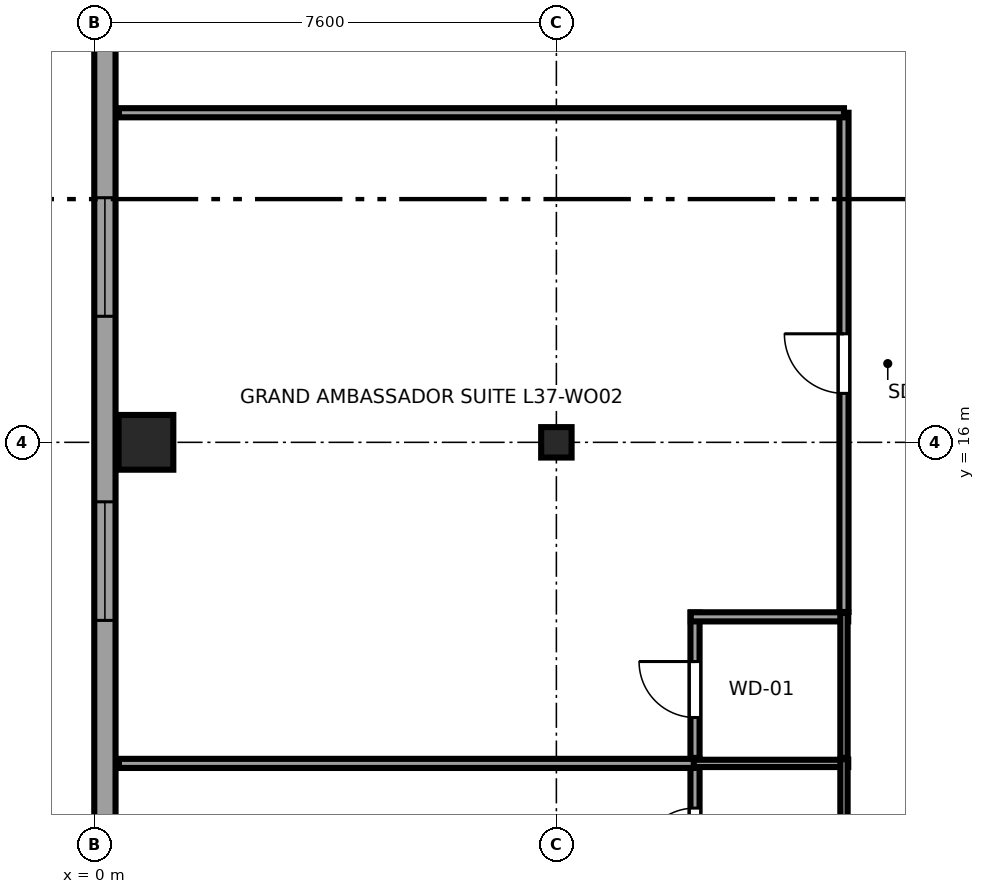
"""IFC4 building model, lengths in metres.
Left out: names, types, materials, properties, quantities, classifications, styles, units other than length and angle.
Written with IfcOpenShell. Run it as: python <this file> out.ifc"""

import sys

from ifc_helpers import new_model, si_unit, direction, frame, frame_2d, origin, origin_2d, place, context, subcontext, project, spatial, rectangle, i_section, extrude, source, transform, mapped, element, fill, save


model = new_model("IFC4")
c1 = context("Model", 3, precision=1e-05, world=origin(), true_north=direction((0.0, 1.0)))
c2 = subcontext(c1, "Body", "Model", "MODEL_VIEW")
j1 = project(units=[si_unit("LENGTHUNIT", "METRE"), si_unit("PLANEANGLEUNIT", "RADIAN")], contexts=[c1])
p1 = place(None, origin())
s1 = spatial("IfcSite", under=j1, at=p1, CompositionType="ELEMENT")
p2 = place(p1, origin())
s2 = spatial("IfcBuilding", under=s1, at=p2, CompositionType="ELEMENT")
p3 = place(p2, frame((0.0, 0.0, 143.5)))
s3 = spatial("IfcBuildingStorey", under=s2, at=p3, CompositionType="ELEMENT", Elevation=143.5)
m1 = source(origin(), c2, "Body", "SweptSolid", [
    extrude(rectangle(XDim=0.9, YDim=0.9, at=origin_2d()), origin(), (0.0, 0.0, 1.0), 3.55),
])
p4 = place(p3, frame((0.85, 16.0, 0.0), z_axis=(0.0, 0.0, 1.0), x_axis=(1.0, 0.0, 0.0)))
e1 = element("IfcColumn", 1, at=p4, inside=s3, PredefinedType="COLUMN", context=c2, shape_type="MappedRepresentation", body=[
    mapped(m1, transform((0.0, 0.0, 0.0), x_axis=(1.0, 0.0, 0.0), y_axis=(0.0, 1.0, 0.0), z_axis=(0.0, 0.0, 1.0), scale=1.0)),
])
m2 = source(origin(), c2, "Body", "SweptSolid", [
    extrude(i_section(OverallWidth=0.5, OverallDepth=0.5, WebThickness=0.022, FlangeThickness=0.034, at=origin_2d()), origin(), (0.0, 0.0, 1.0), 3.55),
])
p5 = place(p3, frame((7.6, 16.0, 0.0), z_axis=(0.0, 0.0, 1.0), x_axis=(1.0, 0.0, 0.0)))
e2 = element("IfcColumn", 2, at=p5, inside=s3, PredefinedType="COLUMN", context=c2, shape_type="MappedRepresentation", body=[
    mapped(m2, transform((0.0, 0.0, 0.0), x_axis=(1.0, 0.0, 0.0), y_axis=(0.0, 1.0, 0.0), z_axis=(0.0, 0.0, 1.0), scale=1.0)),
])
p6 = place(p3, frame((0.175, 41.383, 0.0), z_axis=(0.0, 0.0, 1.0), x_axis=(0.0, -1.0, 0.0)))
e3 = element("IfcWall", 3, at=p6, inside=s3, PredefinedType="SOLIDWALL", context=c2, shape_type="SweptSolid", body=[
    extrude(rectangle(XDim=36.766, YDim=0.35, at=frame_2d((18.383, 0.0))), origin(), (0.0, 0.0, 1.0), 3.29),
])
p7 = place(p6, frame((0.551, 0.0, 0.68)))
e4 = element("IfcOpeningElement", 4, at=p7, cuts=e3, PredefinedType="OPENING", context=c2, shape_type="SweptSolid", body=[
    extrude(rectangle(XDim=1.95, YDim=1.82, at=frame_2d((0.975, 0.91))), frame((0.0, 0.185, 0.0), z_axis=(0.0, -1.0, 0.0), x_axis=(1.0, 0.0, 0.0)), (0.0, 0.0, 1.0), 0.37),
])
p8 = place(p6, frame((4.503, 0.0, 0.68)))
e5 = element("IfcOpeningElement", 5, at=p8, cuts=e3, PredefinedType="OPENING", context=c2, shape_type="SweptSolid", body=[
    extrude(rectangle(XDim=1.95, YDim=1.82, at=frame_2d((0.975, 0.91))), frame((0.0, 0.185, 0.0), z_axis=(0.0, -1.0, 0.0), x_axis=(1.0, 0.0, 0.0)), (0.0, 0.0, 1.0), 0.37),
])
p9 = place(p6, frame((10.554, 0.0, 0.68)))
e6 = element("IfcOpeningElement", 6, at=p9, cuts=e3, PredefinedType="OPENING", context=c2, shape_type="SweptSolid", body=[
    extrude(rectangle(XDim=1.95, YDim=1.82, at=frame_2d((0.975, 0.91))), frame((0.0, 0.185, 0.0), z_axis=(0.0, -1.0, 0.0), x_axis=(1.0, 0.0, 0.0)), (0.0, 0.0, 1.0), 0.37),
])
p10 = place(p6, frame((13.456, 0.0, 0.68)))
e7 = element("IfcOpeningElement", 7, at=p10, cuts=e3, PredefinedType="OPENING", context=c2, shape_type="SweptSolid", body=[
    extrude(rectangle(XDim=1.95, YDim=1.82, at=frame_2d((0.975, 0.91))), frame((0.0, 0.185, 0.0), z_axis=(0.0, -1.0, 0.0), x_axis=(1.0, 0.0, 0.0)), (0.0, 0.0, 1.0), 0.37),
])
p11 = place(p6, frame((21.36, 0.0, 0.68)))
e8 = element("IfcOpeningElement", 8, at=p11, cuts=e3, PredefinedType="OPENING", context=c2, shape_type="SweptSolid", body=[
    extrude(rectangle(XDim=1.95, YDim=1.82, at=frame_2d((0.975, 0.91))), frame((0.0, 0.185, 0.0), z_axis=(0.0, -1.0, 0.0), x_axis=(1.0, 0.0, 0.0)), (0.0, 0.0, 1.0), 0.37),
])
p12 = place(p6, frame((26.361, 0.0, 0.68)))
e9 = element("IfcOpeningElement", 9, at=p12, cuts=e3, PredefinedType="OPENING", context=c2, shape_type="SweptSolid", body=[
    extrude(rectangle(XDim=1.95, YDim=1.82, at=frame_2d((0.975, 0.91))), frame((0.0, 0.185, 0.0), z_axis=(0.0, -1.0, 0.0), x_axis=(1.0, 0.0, 0.0)), (0.0, 0.0, 1.0), 0.37),
])
p13 = place(p6, frame((34.265, 0.0, 0.68)))
e10 = element("IfcOpeningElement", 10, at=p13, cuts=e3, PredefinedType="OPENING", context=c2, shape_type="SweptSolid", body=[
    extrude(rectangle(XDim=1.95, YDim=1.82, at=frame_2d((0.975, 0.91))), frame((0.0, 0.185, 0.0), z_axis=(0.0, -1.0, 0.0), x_axis=(1.0, 0.0, 0.0)), (0.0, 0.0, 1.0), 0.37),
])
p14 = place(p3, frame((9.88, 8.4, 0.0), z_axis=(0.0, 0.0, 1.0), x_axis=(0.0, 1.0, 0.0)))
e11 = element("IfcWall", 11, at=p14, inside=s3, PredefinedType="PARTITIONING", context=c2, shape_type="SweptSolid", body=[
    extrude(rectangle(XDim=2.39, YDim=0.15, at=frame_2d((1.195, 0.0))), origin(), (0.0, 0.0, 1.0), 3.29),
])
p15 = place(p14, frame((0.665, 0.0, 0.0)))
e12 = element("IfcOpeningElement", 12, at=p15, cuts=e11, PredefinedType="OPENING", context=c2, shape_type="SweptSolid", body=[
    extrude(rectangle(XDim=0.92, YDim=2.01, at=frame_2d((0.46, 1.005))), frame((0.0, 0.085, 0.0), z_axis=(0.0, -1.0, 0.0), x_axis=(1.0, 0.0, 0.0)), (0.0, 0.0, 1.0), 0.17),
])
p16 = place(p3, frame((9.81, 10.72, 0.0), z_axis=(0.0, 0.0, 1.0), x_axis=(1.0, 0.0, 0.0)))
e13 = element("IfcWall", 13, at=p16, inside=s3, PredefinedType="PLUMBINGWALL", context=c2, shape_type="SweptSolid", body=[
    extrude(rectangle(XDim=2.59, YDim=0.12, at=frame_2d((1.295, 0.0))), origin(), (0.0, 0.0, 1.0), 3.29),
])
p17 = place(p3, frame((12.33, 8.4, 0.0), z_axis=(0.0, 0.0, 1.0), x_axis=(0.0, 1.0, 0.0)))
e14 = element("IfcWall", 14, at=p17, inside=s3, PredefinedType="PLUMBINGWALL", context=c2, shape_type="SweptSolid", body=[
    extrude(rectangle(XDim=2.39, YDim=0.12, at=frame_2d((1.195, 0.0))), origin(), (0.0, 0.0, 1.0), 3.29),
])
p18 = place(p3, frame((9.88, 10.81, 0.0), z_axis=(0.0, 0.0, 1.0), x_axis=(0.0, 1.0, 0.0)))
e15 = element("IfcWall", 15, at=p18, inside=s3, PredefinedType="PARTITIONING", context=c2, shape_type="SweptSolid", body=[
    extrude(rectangle(XDim=2.39, YDim=0.15, at=frame_2d((1.195, 0.0))), origin(), (0.0, 0.0, 1.0), 3.29),
])
p19 = place(p18, frame((0.665, 0.0, 0.0)))
e16 = element("IfcOpeningElement", 16, at=p19, cuts=e15, PredefinedType="OPENING", context=c2, shape_type="SweptSolid", body=[
    extrude(rectangle(XDim=0.92, YDim=2.01, at=frame_2d((0.46, 1.005))), frame((0.0, 0.085, 0.0), z_axis=(0.0, -1.0, 0.0), x_axis=(1.0, 0.0, 0.0)), (0.0, 0.0, 1.0), 0.17),
])
p20 = place(p3, frame((9.81, 13.13, 0.0), z_axis=(0.0, 0.0, 1.0), x_axis=(1.0, 0.0, 0.0)))
e17 = element("IfcWall", 17, at=p20, inside=s3, PredefinedType="PARTITIONING", context=c2, shape_type="SweptSolid", body=[
    extrude(rectangle(XDim=2.59, YDim=0.15, at=frame_2d((1.295, 0.0))), origin(), (0.0, 0.0, 1.0), 3.29),
])
p21 = place(p3, frame((12.33, 10.81, 0.0), z_axis=(0.0, 0.0, 1.0), x_axis=(0.0, 1.0, 0.0)))
e18 = element("IfcWall", 18, at=p21, inside=s3, PredefinedType="PLUMBINGWALL", context=c2, shape_type="SweptSolid", body=[
    extrude(rectangle(XDim=2.39, YDim=0.12, at=frame_2d((1.195, 0.0))), origin(), (0.0, 0.0, 1.0), 3.29),
])
p22 = place(p3, frame((0.405, 10.72, 0.0), z_axis=(0.0, 0.0, 1.0), x_axis=(1.0, 0.0, 0.0)))
e19 = element("IfcWall", 19, at=p22, inside=s3, PredefinedType="PARTITIONING", context=c2, shape_type="SweptSolid", body=[
    extrude(rectangle(XDim=9.455, YDim=0.15, at=frame_2d((4.728, 0.0))), origin(), (0.0, 0.0, 1.0), 3.29),
])
p23 = place(p3, frame((12.33, 13.21, 0.0), z_axis=(0.0, 0.0, 1.0), x_axis=(0.0, 1.0, 0.0)))
e20 = element("IfcWall", 20, at=p23, inside=s3, PredefinedType="PARTITIONING", context=c2, shape_type="SweptSolid", body=[
    extrude(rectangle(XDim=8.21, YDim=0.15, at=frame_2d((4.105, 0.0))), origin(), (0.0, 0.0, 1.0), 3.29),
])
p24 = place(p23, frame((3.595, 0.0, 0.0)))
e21 = element("IfcOpeningElement", 21, at=p24, cuts=e20, PredefinedType="OPENING", context=c2, shape_type="SweptSolid", body=[
    extrude(rectangle(XDim=0.98, YDim=2.12, at=frame_2d((0.49, 1.06))), frame((0.0, 0.085, 0.0), z_axis=(0.0, -1.0, 0.0), x_axis=(1.0, 0.0, 0.0)), (0.0, 0.0, 1.0), 0.17),
])
p25 = place(p3, frame((0.405, 21.42, 0.0), z_axis=(0.0, 0.0, 1.0), x_axis=(1.0, 0.0, 0.0)))
e22 = element("IfcWall", 22, at=p25, inside=s3, PredefinedType="PARTITIONING", context=c2, shape_type="SweptSolid", body=[
    extrude(rectangle(XDim=11.925, YDim=0.15, at=frame_2d((5.962, 0.0))), origin(), (0.0, 0.0, 1.0), 3.29),
])
m3 = source(origin(), c2, "Body", "SweptSolid", [
    extrude(rectangle(XDim=1.95, YDim=1.82, at=frame_2d((0.975, 0.91))), frame((0.0, 0.09, 0.0), z_axis=(0.0, -1.0, 0.0), x_axis=(1.0, 0.0, 0.0)), (0.0, 0.0, 1.0), 0.06),
])
p26 = place(p11, origin())
e23 = element("IfcWindow", 23, at=p26, inside=s3, PartitioningType="DOUBLE_PANEL_VERTICAL", PredefinedType="WINDOW", context=c2, shape_type="MappedRepresentation", body=[
    mapped(m3, transform((0.0, 0.0, 0.0), x_axis=(1.0, 0.0, 0.0), y_axis=(0.0, 1.0, 0.0), z_axis=(0.0, 0.0, 1.0), scale=1.0)),
])
fill(e8, e23)
p27 = place(p12, origin())
e24 = element("IfcWindow", 24, at=p27, inside=s3, PartitioningType="DOUBLE_PANEL_VERTICAL", PredefinedType="WINDOW", context=c2, shape_type="MappedRepresentation", body=[
    mapped(m3, transform((0.0, 0.0, 0.0), x_axis=(1.0, 0.0, 0.0), y_axis=(0.0, 1.0, 0.0), z_axis=(0.0, 0.0, 1.0), scale=1.0)),
])
fill(e9, e24)
m4 = source(origin(), c2, "Body", "SweptSolid", [
    extrude(rectangle(XDim=0.92, YDim=2.01, at=frame_2d((0.46, 1.005))), frame((0.0, 0.025, 0.0), z_axis=(0.0, -1.0, 0.0), x_axis=(1.0, 0.0, 0.0)), (0.0, 0.0, 1.0), 0.05),
])
p28 = place(p15, origin())
e25 = element("IfcDoor", 25, at=p28, inside=s3, OperationType="SINGLE_SWING_LEFT", PredefinedType="DOOR", context=c2, shape_type="MappedRepresentation", body=[
    mapped(m4, transform((0.0, 0.0, 0.0), x_axis=(1.0, 0.0, 0.0), y_axis=(0.0, 1.0, 0.0), z_axis=(0.0, 0.0, 1.0), scale=1.0)),
])
fill(e12, e25)
p29 = place(p19, origin())
e26 = element("IfcDoor", 26, at=p29, inside=s3, OperationType="SINGLE_SWING_RIGHT", PredefinedType="DOOR", context=c2, shape_type="MappedRepresentation", body=[
    mapped(m4, transform((0.0, 0.0, 0.0), x_axis=(1.0, 0.0, 0.0), y_axis=(0.0, 1.0, 0.0), z_axis=(0.0, 0.0, 1.0), scale=1.0)),
])
fill(e16, e26)
m5 = source(origin(), c2, "Body", "SweptSolid", [
    extrude(rectangle(XDim=0.98, YDim=2.12, at=frame_2d((0.49, 1.06))), frame((0.0, 0.025, 0.0), z_axis=(0.0, -1.0, 0.0), x_axis=(1.0, 0.0, 0.0)), (0.0, 0.0, 1.0), 0.05),
])
p30 = place(p24, origin())
e27 = element("IfcDoor", 27, at=p30, inside=s3, OperationType="SINGLE_SWING_RIGHT", PredefinedType="DOOR", context=c2, shape_type="MappedRepresentation", body=[
    mapped(m5, transform((0.0, 0.0, 0.0), x_axis=(1.0, 0.0, 0.0), y_axis=(0.0, 1.0, 0.0), z_axis=(0.0, 0.0, 1.0), scale=1.0)),
])
fill(e21, e27)
save(model, sys.argv[1])
